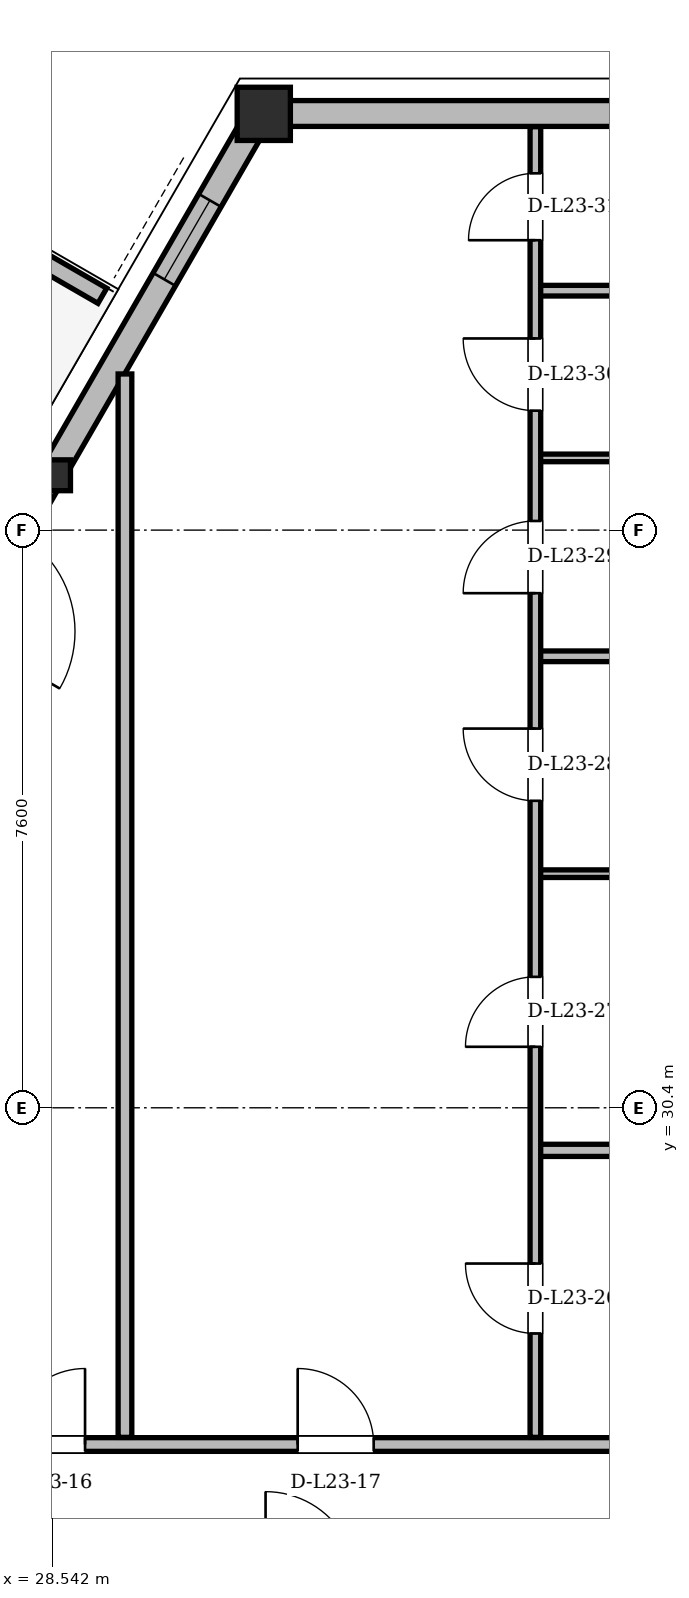
"""IFC4 building model, lengths in metres.
Left out: names, types, materials, properties, quantities, classifications, styles, units other than length and angle.
Written with IfcOpenShell. Run it as: python <this file> out.ifc"""

import sys

from ifc_helpers import new_model, si_unit, direction, frame, frame_2d, origin, origin_2d, place, context, subcontext, project, spatial, polyline, rectangle, hollow_rectangle, i_section, outline, extrude, element, fill, save


model = new_model("IFC4")
c1 = context("Model", 3, precision=1e-05, world=origin(), true_north=direction((0.0, 1.0)))
c2 = subcontext(c1, "Body", "Model", "MODEL_VIEW")
j1 = project(units=[si_unit("LENGTHUNIT", "METRE"), si_unit("PLANEANGLEUNIT", "RADIAN")], contexts=[c1])
p1 = place(None, origin())
s1 = spatial("IfcSite", under=j1, at=p1, CompositionType="ELEMENT")
p2 = place(p1, origin())
s2 = spatial("IfcBuilding", under=s1, at=p2, CompositionType="ELEMENT")
p3 = place(p2, frame((0.0, 0.0, 89.7)))
s3 = spatial("IfcBuildingStorey", under=s2, at=p3, CompositionType="ELEMENT", Elevation=89.7)
p4 = place(p3, frame((31.278, 43.481, 0.005), z_axis=(0.027185941193, -0.002582664413, 0.99962705768), x_axis=(0.094574192526, 0.995517816068, 0.0)))
e1 = element("IfcColumn", 1, at=p4, inside=s3, PredefinedType="COLUMN", context=c2, shape_type="SweptSolid", body=[
    extrude(hollow_rectangle(XDim=0.7, YDim=0.7, WallThickness=0.055, at=origin_2d()), origin(), (0.0, 0.0, 1.0), 3.592),
])
p5 = place(p3, frame((28.535, 38.732, 0.005), z_axis=(0.025419707024, -0.005709239011, 0.999660563934), x_axis=(0.219139714241, 0.975693489597, 0.0)))
e2 = element("IfcColumn", 2, at=p5, inside=s3, PredefinedType="COLUMN", context=c2, shape_type="SweptSolid", body=[
    extrude(i_section(OverallWidth=0.404, OverallDepth=0.406, WebThickness=0.027, FlangeThickness=0.044, at=origin_2d()), origin(), (0.0, 0.0, 1.0), 3.592),
])
p6 = place(p3, frame((43.722, 43.481, 0.0), z_axis=(0.0, 0.0, 1.0), x_axis=(-1.0, 0.0, 0.0)))
e3 = element("IfcWall", 3, at=p6, inside=s3, PredefinedType="SOLIDWALL", context=c2, shape_type="SweptSolid", body=[
    extrude(rectangle(XDim=12.445, YDim=0.34, at=frame_2d((6.222, 0.0))), origin(), (0.0, 0.0, 1.0), 2.578),
])
p7 = place(p6, frame((3.549, 0.0, 0.85)))
e4 = element("IfcOpeningElement", 4, at=p7, cuts=e3, PredefinedType="OPENING", context=c2, shape_type="SweptSolid", body=[
    extrude(rectangle(XDim=1.2, YDim=1.48, at=frame_2d((0.6, 0.74))), frame((0.0, 0.17, 0.0), z_axis=(0.0, -1.0, 0.0), x_axis=(1.0, 0.0, 0.0)), (0.0, 0.0, 1.0), 0.34),
])
p8 = place(p3, frame((31.278, 43.481, 0.0), z_axis=(0.0, 0.0, 1.0), x_axis=(-0.500004029544, -0.866023077313, 0.0)))
e5 = element("IfcWall", 5, at=p8, inside=s3, PredefinedType="SOLIDWALL", context=c2, shape_type="SweptSolid", body=[
    extrude(rectangle(XDim=34.275, YDim=0.34, at=frame_2d((17.137, 0.0))), origin(), (0.0, 0.0, 1.0), 2.578),
])
p9 = place(p8, frame((6.369, 0.0, 0.0)))
e6 = element("IfcOpeningElement", 6, at=p9, cuts=e5, PredefinedType="OPENING", context=c2, shape_type="SweptSolid", body=[
    extrude(rectangle(XDim=1.5, YDim=2.2, at=frame_2d((0.75, 1.1))), frame((0.0, 0.17, 0.0), z_axis=(0.0, -1.0, 0.0), x_axis=(1.0, 0.0, 0.0)), (0.0, 0.0, 1.0), 0.34),
])
p10 = place(p8, frame((26.0, 0.0, 0.0)))
e7 = element("IfcOpeningElement", 7, at=p10, cuts=e5, PredefinedType="OPENING", context=c2, shape_type="SweptSolid", body=[
    extrude(rectangle(XDim=1.5, YDim=2.2, at=frame_2d((0.75, 1.1))), frame((0.0, 0.17, 0.0), z_axis=(0.0, -1.0, 0.0), x_axis=(1.0, 0.0, 0.0)), (0.0, 0.0, 1.0), 0.34),
])
p11 = place(p8, frame((32.118, 0.0, 0.85)))
e8 = element("IfcOpeningElement", 8, at=p11, cuts=e5, PredefinedType="OPENING", context=c2, shape_type="SweptSolid", body=[
    extrude(rectangle(XDim=1.2, YDim=1.48, at=frame_2d((0.6, 0.74))), frame((0.0, 0.17, 0.0), z_axis=(0.0, -1.0, 0.0), x_axis=(1.0, 0.0, 0.0)), (0.0, 0.0, 1.0), 0.34),
])
p12 = place(p8, frame((29.585, 0.0, 0.85)))
e9 = element("IfcOpeningElement", 9, at=p12, cuts=e5, PredefinedType="OPENING", context=c2, shape_type="SweptSolid", body=[
    extrude(rectangle(XDim=1.2, YDim=1.48, at=frame_2d((0.6, 0.74))), frame((0.0, 0.17, 0.0), z_axis=(0.0, -1.0, 0.0), x_axis=(1.0, 0.0, 0.0)), (0.0, 0.0, 1.0), 0.34),
])
p13 = place(p8, frame((11.097, 0.0, 0.85)))
e10 = element("IfcOpeningElement", 10, at=p13, cuts=e5, PredefinedType="OPENING", context=c2, shape_type="SweptSolid", body=[
    extrude(rectangle(XDim=2.4, YDim=1.618, at=frame_2d((1.2, 0.809))), frame((0.0, 0.17, 0.0), z_axis=(0.0, -1.0, 0.0), x_axis=(1.0, 0.0, 0.0)), (0.0, 0.0, 1.0), 0.34),
])
p14 = place(p8, frame((14.724, 0.0, 0.85)))
e11 = element("IfcOpeningElement", 11, at=p14, cuts=e5, PredefinedType="OPENING", context=c2, shape_type="SweptSolid", body=[
    extrude(rectangle(XDim=1.2, YDim=1.48, at=frame_2d((0.6, 0.74))), frame((0.0, 0.17, 0.0), z_axis=(0.0, -1.0, 0.0), x_axis=(1.0, 0.0, 0.0)), (0.0, 0.0, 1.0), 0.34),
])
p15 = place(p8, frame((17.3, 0.0, 0.85)))
e12 = element("IfcOpeningElement", 12, at=p15, cuts=e5, PredefinedType="OPENING", context=c2, shape_type="SweptSolid", body=[
    extrude(rectangle(XDim=1.2, YDim=1.48, at=frame_2d((0.6, 0.74))), frame((0.0, 0.17, 0.0), z_axis=(0.0, -1.0, 0.0), x_axis=(1.0, 0.0, 0.0)), (0.0, 0.0, 1.0), 0.34),
])
p16 = place(p8, frame((1.32, 0.0, 0.85)))
e13 = element("IfcOpeningElement", 13, at=p16, cuts=e5, PredefinedType="OPENING", context=c2, shape_type="SweptSolid", body=[
    extrude(rectangle(XDim=1.2, YDim=1.48, at=frame_2d((0.6, 0.74))), frame((0.0, 0.17, 0.0), z_axis=(0.0, -1.0, 0.0), x_axis=(1.0, 0.0, 0.0)), (0.0, 0.0, 1.0), 0.34),
])
p17 = place(p3, frame((29.202, 41.083, 0.0), z_axis=(0.0, 0.0, 1.0), x_axis=(-0.866012356593, 0.500022597718, 0.0)))
e14 = element("IfcWall", 14, at=p17, inside=s3, PredefinedType="PARAPET", context=c2, shape_type="SweptSolid", body=[
    extrude(outline(polyline([(0.0, 0.0), (2.042, 0.0), (2.042, 1.1), (0.0, 1.32), (0.0, 0.0)])), frame((0.0, 0.115, 0.0), z_axis=(0.0, -1.0, 0.0), x_axis=(1.0, 0.0, 0.0)), (0.0, 0.0, 1.0), 0.23),
])
p18 = place(p3, frame((27.55, 25.97, 0.0), z_axis=(0.0, 0.0, 1.0), x_axis=(1.0, 0.0, 0.0)))
e15 = element("IfcWall", 15, at=p18, inside=s3, PredefinedType="PARTITIONING", context=c2, shape_type="SweptSolid", body=[
    extrude(rectangle(XDim=19.9, YDim=0.18, at=frame_2d((9.95, 0.0))), origin(), (0.0, 0.0, 1.0), 2.814),
])
p19 = place(p18, frame((0.425, 0.0, 0.0)))
e16 = element("IfcOpeningElement", 16, at=p19, cuts=e15, PredefinedType="OPENING", context=c2, shape_type="SweptSolid", body=[
    extrude(rectangle(XDim=1.0, YDim=2.18, at=frame_2d((0.5, 1.09))), frame((0.0, 0.09, 0.0), z_axis=(0.0, -1.0, 0.0), x_axis=(1.0, 0.0, 0.0)), (0.0, 0.0, 1.0), 0.18),
])
p20 = place(p18, frame((4.222, 0.0, 0.0)))
e17 = element("IfcOpeningElement", 17, at=p20, cuts=e15, PredefinedType="OPENING", context=c2, shape_type="SweptSolid", body=[
    extrude(rectangle(XDim=1.0, YDim=2.18, at=frame_2d((0.5, 1.09))), frame((0.0, 0.09, 0.0), z_axis=(0.0, -1.0, 0.0), x_axis=(1.0, 0.0, 0.0)), (0.0, 0.0, 1.0), 0.18),
])
p21 = place(p18, frame((13.4, 0.0, 0.0)))
e18 = element("IfcOpeningElement", 18, at=p21, cuts=e15, PredefinedType="OPENING", context=c2, shape_type="SweptSolid", body=[
    extrude(rectangle(XDim=1.3, YDim=2.2, at=frame_2d((0.65, 1.1))), frame((0.0, 0.09, 0.0), z_axis=(0.0, -1.0, 0.0), x_axis=(1.0, 0.0, 0.0)), (0.0, 0.0, 1.0), 0.18),
])
p22 = place(p18, frame((16.95, 0.0, 0.0)))
e19 = element("IfcOpeningElement", 19, at=p22, cuts=e15, PredefinedType="OPENING", context=c2, shape_type="SweptSolid", body=[
    extrude(rectangle(XDim=1.0, YDim=2.18, at=frame_2d((0.5, 1.09))), frame((0.0, 0.09, 0.0), z_axis=(0.0, -1.0, 0.0), x_axis=(1.0, 0.0, 0.0)), (0.0, 0.0, 1.0), 0.18),
])
p23 = place(p3, frame((34.9, 29.84, 0.0), z_axis=(0.0, 0.0, 1.0), x_axis=(1.0, 0.0, 0.0)))
e20 = element("IfcWall", 20, at=p23, inside=s3, PredefinedType="PARTITIONING", context=c2, shape_type="SweptSolid", body=[
    extrude(rectangle(XDim=3.15, YDim=0.16, at=frame_2d((1.575, 0.0))), origin(), (0.0, 0.0, 1.0), 3.36),
])
p24 = place(p3, frame((34.9, 33.48, 0.0), z_axis=(0.0, 0.0, 1.0), x_axis=(1.0, 0.0, 0.0)))
e21 = element("IfcWall", 21, at=p24, inside=s3, PredefinedType="PARTITIONING", context=c2, shape_type="SweptSolid", body=[
    extrude(rectangle(XDim=3.15, YDim=0.1, at=frame_2d((1.575, 0.0))), origin(), (0.0, 0.0, 1.0), 3.36),
])
p25 = place(p3, frame((34.9, 36.34, 0.0), z_axis=(0.0, 0.0, 1.0), x_axis=(1.0, 0.0, 0.0)))
e22 = element("IfcWall", 22, at=p25, inside=s3, PredefinedType="PARTITIONING", context=c2, shape_type="SweptSolid", body=[
    extrude(rectangle(XDim=3.15, YDim=0.14, at=frame_2d((1.575, 0.0))), origin(), (0.0, 0.0, 1.0), 3.36),
])
p26 = place(p3, frame((34.9, 38.95, 0.0), z_axis=(0.0, 0.0, 1.0), x_axis=(1.0, 0.0, 0.0)))
e23 = element("IfcWall", 23, at=p26, inside=s3, PredefinedType="PARTITIONING", context=c2, shape_type="SweptSolid", body=[
    extrude(rectangle(XDim=3.15, YDim=0.1, at=frame_2d((1.575, 0.0))), origin(), (0.0, 0.0, 1.0), 3.36),
])
p27 = place(p3, frame((34.9, 41.15, 0.0), z_axis=(0.0, 0.0, 1.0), x_axis=(1.0, 0.0, 0.0)))
e24 = element("IfcWall", 24, at=p27, inside=s3, PredefinedType="PARTITIONING", context=c2, shape_type="SweptSolid", body=[
    extrude(rectangle(XDim=3.15, YDim=0.14, at=frame_2d((1.575, 0.0))), origin(), (0.0, 0.0, 1.0), 3.36),
])
p28 = place(p3, frame((29.5, 26.064, 0.0), z_axis=(0.0, 0.0, 1.0), x_axis=(0.0, 1.0, 0.0)))
e25 = element("IfcWall", 25, at=p28, inside=s3, PredefinedType="PARTITIONING", context=c2, shape_type="SweptSolid", body=[
    extrude(rectangle(XDim=13.99, YDim=0.18, at=frame_2d((6.995, 0.0))), origin(), (0.0, 0.0, 1.0), 2.578),
])
p29 = place(p3, frame((34.9, 26.064, 0.0), z_axis=(0.0, 0.0, 1.0), x_axis=(0.0, 1.0, 0.0)))
e26 = element("IfcWall", 26, at=p29, inside=s3, PredefinedType="PARTITIONING", context=c2, shape_type="SweptSolid", body=[
    extrude(rectangle(XDim=17.243, YDim=0.14, at=frame_2d((8.622, 0.0))), origin(), (0.0, 0.0, 1.0), 3.36),
])
p30 = place(p29, frame((1.367, 0.0, 0.0)))
e27 = element("IfcOpeningElement", 27, at=p30, cuts=e26, PredefinedType="OPENING", context=c2, shape_type="SweptSolid", body=[
    extrude(rectangle(XDim=0.92, YDim=2.12, at=frame_2d((0.46, 1.06))), frame((0.0, 0.07, 0.0), z_axis=(0.0, -1.0, 0.0), x_axis=(1.0, 0.0, 0.0)), (0.0, 0.0, 1.0), 0.14),
])
p31 = place(p29, frame((5.138, 0.0, 0.0)))
e28 = element("IfcOpeningElement", 28, at=p31, cuts=e26, PredefinedType="OPENING", context=c2, shape_type="SweptSolid", body=[
    extrude(rectangle(XDim=0.92, YDim=2.12, at=frame_2d((0.46, 1.06))), frame((0.0, 0.07, 0.0), z_axis=(0.0, -1.0, 0.0), x_axis=(1.0, 0.0, 0.0)), (0.0, 0.0, 1.0), 0.14),
])
p32 = place(p29, frame((8.375, 0.0, 0.0)))
e29 = element("IfcOpeningElement", 29, at=p32, cuts=e26, PredefinedType="OPENING", context=c2, shape_type="SweptSolid", body=[
    extrude(rectangle(XDim=0.95, YDim=2.1, at=frame_2d((0.475, 1.05))), frame((0.0, 0.07, 0.0), z_axis=(0.0, -1.0, 0.0), x_axis=(1.0, 0.0, 0.0)), (0.0, 0.0, 1.0), 0.14),
])
p33 = place(p29, frame((11.106, 0.0, 0.0)))
e30 = element("IfcOpeningElement", 30, at=p33, cuts=e26, PredefinedType="OPENING", context=c2, shape_type="SweptSolid", body=[
    extrude(rectangle(XDim=0.95, YDim=2.1, at=frame_2d((0.475, 1.05))), frame((0.0, 0.07, 0.0), z_axis=(0.0, -1.0, 0.0), x_axis=(1.0, 0.0, 0.0)), (0.0, 0.0, 1.0), 0.14),
])
p34 = place(p29, frame((13.507, 0.0, 0.0)))
e31 = element("IfcOpeningElement", 31, at=p34, cuts=e26, PredefinedType="OPENING", context=c2, shape_type="SweptSolid", body=[
    extrude(rectangle(XDim=0.95, YDim=2.1, at=frame_2d((0.475, 1.05))), frame((0.0, 0.07, 0.0), z_axis=(0.0, -1.0, 0.0), x_axis=(1.0, 0.0, 0.0)), (0.0, 0.0, 1.0), 0.14),
])
p35 = place(p29, frame((15.75, 0.0, 0.0)))
e32 = element("IfcOpeningElement", 32, at=p35, cuts=e26, PredefinedType="OPENING", context=c2, shape_type="SweptSolid", body=[
    extrude(rectangle(XDim=0.88, YDim=2.08, at=frame_2d((0.44, 1.04))), frame((0.0, 0.07, 0.0), z_axis=(0.0, -1.0, 0.0), x_axis=(1.0, 0.0, 0.0)), (0.0, 0.0, 1.0), 0.14),
])
p36 = place(p16, origin())
e33 = element("IfcWindow", 33, at=p36, inside=s3, PartitioningType="SINGLE_PANEL", PredefinedType="WINDOW", context=c2, shape_type="SweptSolid", body=[
    extrude(rectangle(XDim=1.2, YDim=1.48, at=frame_2d((0.6, 0.74))), frame((0.0, 0.03, 0.0), z_axis=(0.0, -1.0, 0.0), x_axis=(1.0, 0.0, 0.0)), (0.0, 0.0, 1.0), 0.06),
])
fill(e13, e33)
p37 = place(p19, origin())
e34 = element("IfcDoor", 34, at=p37, inside=s3, OperationType="SINGLE_SWING_RIGHT", PredefinedType="DOOR", context=c2, shape_type="SweptSolid", body=[
    extrude(rectangle(XDim=1.0, YDim=2.18, at=frame_2d((0.5, 1.09))), frame((0.0, 0.025, 0.0), z_axis=(0.0, -1.0, 0.0), x_axis=(1.0, 0.0, 0.0)), (0.0, 0.0, 1.0), 0.05),
])
fill(e16, e34)
p38 = place(p20, origin())
e35 = element("IfcDoor", 35, at=p38, inside=s3, OperationType="SINGLE_SWING_LEFT", PredefinedType="DOOR", context=c2, shape_type="SweptSolid", body=[
    extrude(rectangle(XDim=1.0, YDim=2.18, at=frame_2d((0.5, 1.09))), frame((0.0, 0.025, 0.0), z_axis=(0.0, -1.0, 0.0), x_axis=(1.0, 0.0, 0.0)), (0.0, 0.0, 1.0), 0.05),
])
fill(e17, e35)
p39 = place(p30, origin())
e36 = element("IfcDoor", 36, at=p39, inside=s3, OperationType="SINGLE_SWING_RIGHT", PredefinedType="DOOR", context=c2, shape_type="SweptSolid", body=[
    extrude(rectangle(XDim=0.92, YDim=2.12, at=frame_2d((0.46, 1.06))), frame((0.0, 0.025, 0.0), z_axis=(0.0, -1.0, 0.0), x_axis=(1.0, 0.0, 0.0)), (0.0, 0.0, 1.0), 0.05),
])
fill(e27, e36)
p40 = place(p31, origin())
e37 = element("IfcDoor", 37, at=p40, inside=s3, OperationType="SINGLE_SWING_LEFT", PredefinedType="DOOR", context=c2, shape_type="SweptSolid", body=[
    extrude(rectangle(XDim=0.92, YDim=2.12, at=frame_2d((0.46, 1.06))), frame((0.0, 0.025, 0.0), z_axis=(0.0, -1.0, 0.0), x_axis=(1.0, 0.0, 0.0)), (0.0, 0.0, 1.0), 0.05),
])
fill(e28, e37)
p41 = place(p32, origin())
e38 = element("IfcDoor", 38, at=p41, inside=s3, OperationType="SINGLE_SWING_RIGHT", PredefinedType="DOOR", context=c2, shape_type="SweptSolid", body=[
    extrude(rectangle(XDim=0.95, YDim=2.1, at=frame_2d((0.475, 1.05))), frame((0.0, 0.025, 0.0), z_axis=(0.0, -1.0, 0.0), x_axis=(1.0, 0.0, 0.0)), (0.0, 0.0, 1.0), 0.05),
])
fill(e29, e38)
p42 = place(p33, origin())
e39 = element("IfcDoor", 39, at=p42, inside=s3, OperationType="SINGLE_SWING_LEFT", PredefinedType="DOOR", context=c2, shape_type="SweptSolid", body=[
    extrude(rectangle(XDim=0.95, YDim=2.1, at=frame_2d((0.475, 1.05))), frame((0.0, 0.025, 0.0), z_axis=(0.0, -1.0, 0.0), x_axis=(1.0, 0.0, 0.0)), (0.0, 0.0, 1.0), 0.05),
])
fill(e30, e39)
p43 = place(p34, origin())
e40 = element("IfcDoor", 40, at=p43, inside=s3, OperationType="SINGLE_SWING_RIGHT", PredefinedType="DOOR", context=c2, shape_type="SweptSolid", body=[
    extrude(rectangle(XDim=0.95, YDim=2.1, at=frame_2d((0.475, 1.05))), frame((0.0, 0.025, 0.0), z_axis=(0.0, -1.0, 0.0), x_axis=(1.0, 0.0, 0.0)), (0.0, 0.0, 1.0), 0.05),
])
fill(e31, e40)
p44 = place(p35, origin())
e41 = element("IfcDoor", 41, at=p44, inside=s3, OperationType="SINGLE_SWING_LEFT", PredefinedType="DOOR", context=c2, shape_type="SweptSolid", body=[
    extrude(rectangle(XDim=0.88, YDim=2.08, at=frame_2d((0.44, 1.04))), frame((0.0, 0.025, 0.0), z_axis=(0.0, -1.0, 0.0), x_axis=(1.0, 0.0, 0.0)), (0.0, 0.0, 1.0), 0.05),
])
fill(e32, e41)
save(model, sys.argv[1])
